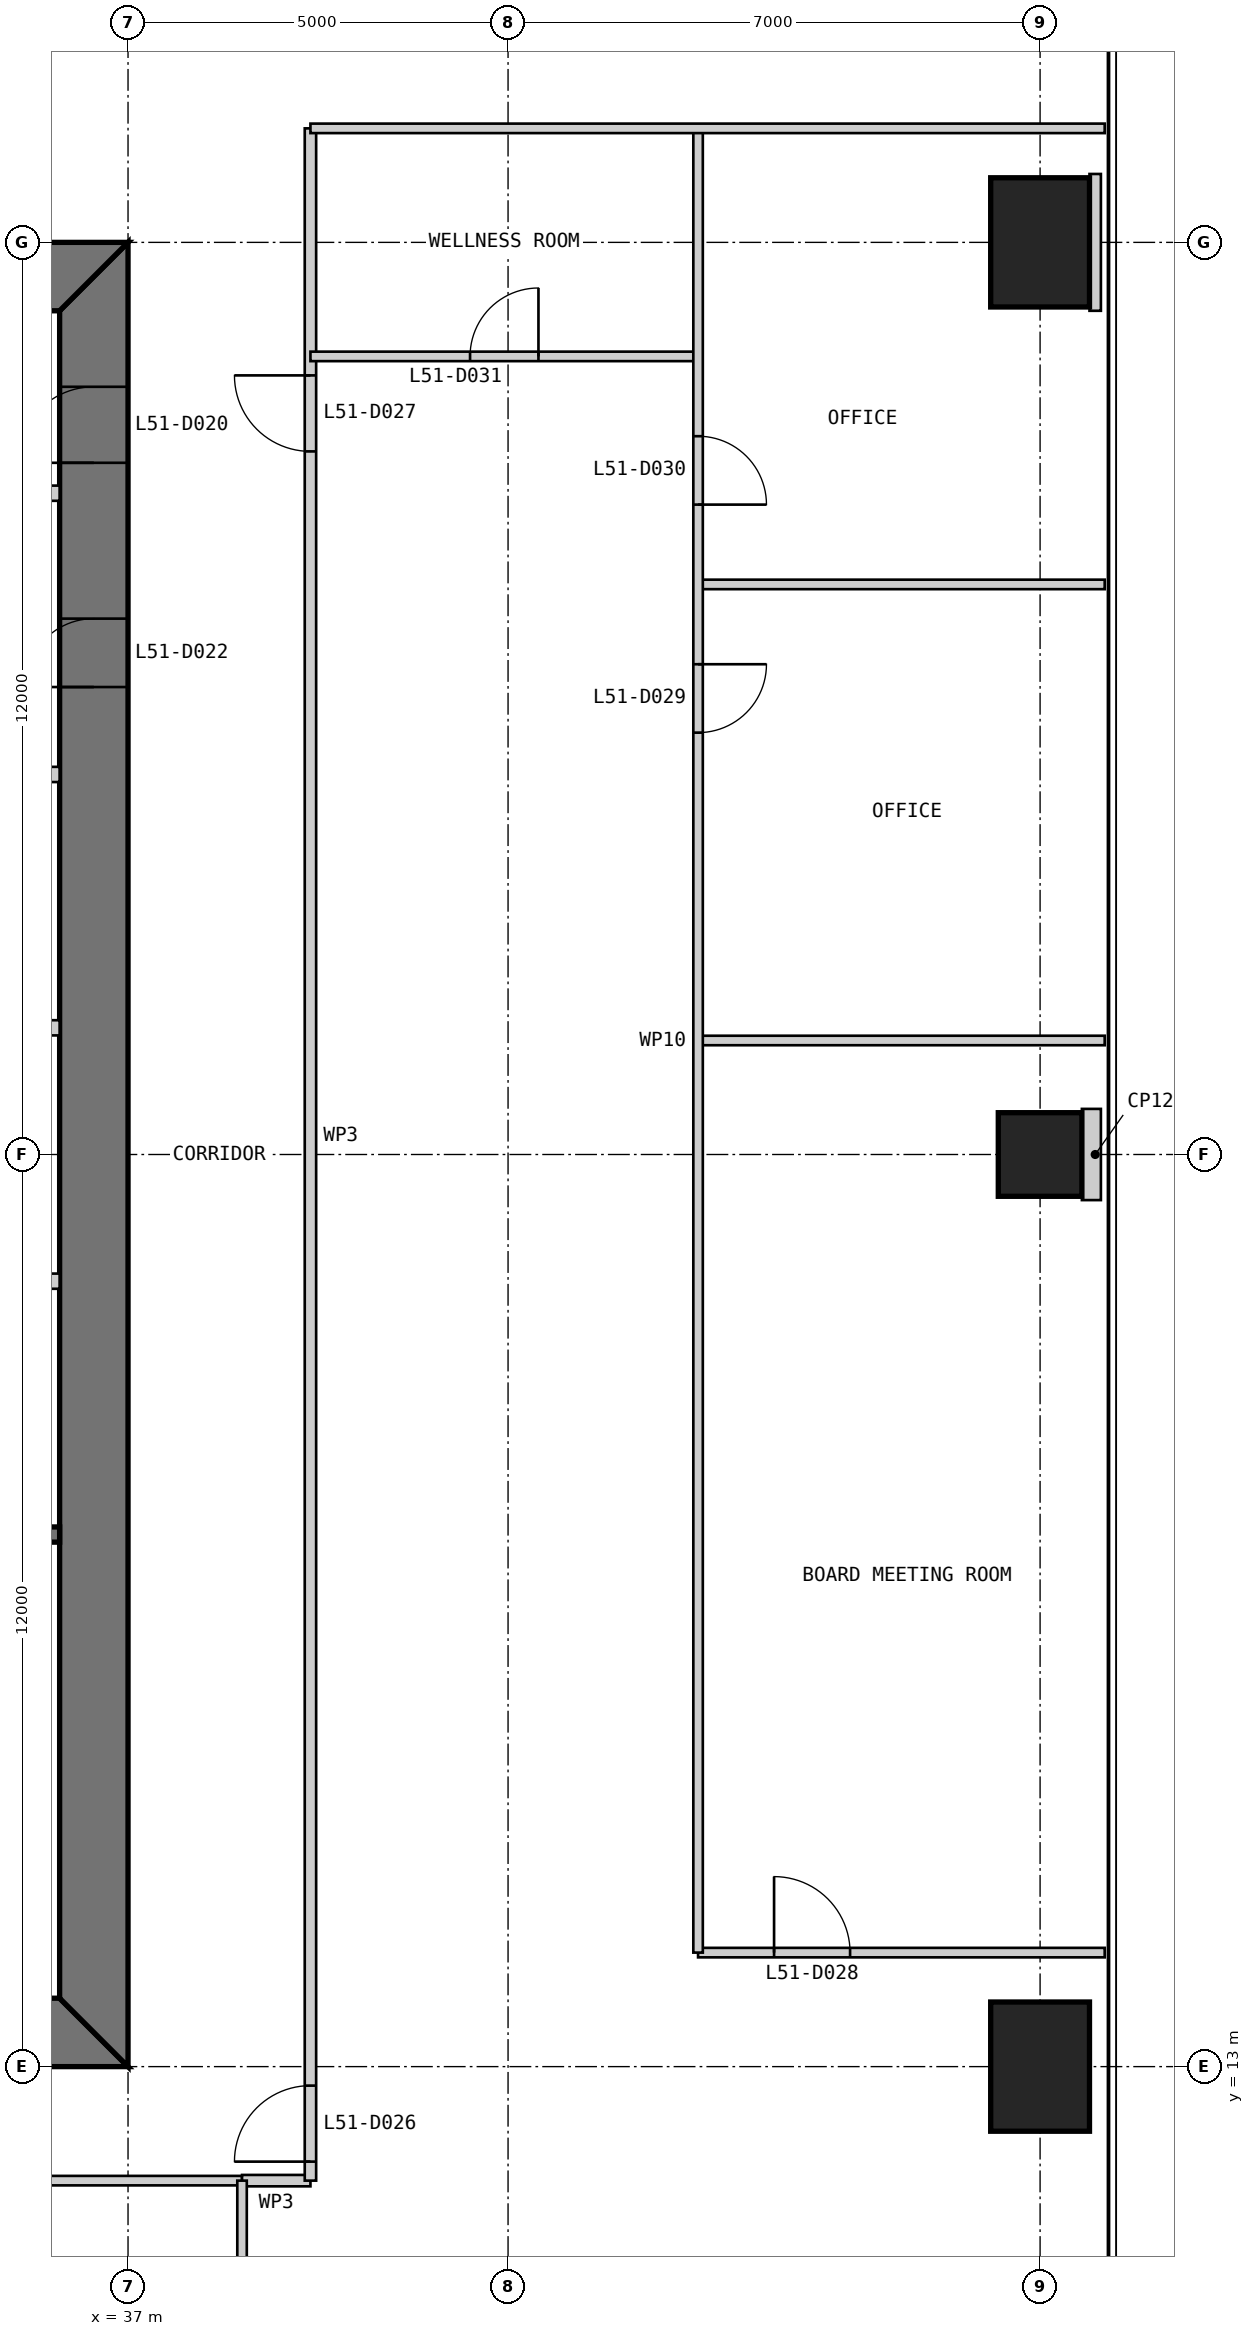
"""IFC4 building model, lengths in metres.
Left out: names, types, materials, properties, quantities, classifications, styles, units other than length and angle.
Written with IfcOpenShell. Run it as: python <this file> out.ifc"""

import sys

from ifc_helpers import new_model, si_unit, direction, frame, frame_2d, origin, origin_2d, place, context, subcontext, project, spatial, polyline, rectangle, outline, extrude, element, fill, save


model = new_model("IFC4")
c1 = context("Model", 3, precision=1e-05, world=origin(), true_north=direction((0.0, 1.0)))
c2 = subcontext(c1, "Body", "Model", "MODEL_VIEW")
j1 = project(units=[si_unit("LENGTHUNIT", "METRE"), si_unit("PLANEANGLEUNIT", "RADIAN")], contexts=[c1])
p1 = place(None, origin())
s1 = spatial("IfcSite", under=j1, at=p1, CompositionType="ELEMENT")
p2 = place(p1, origin())
s2 = spatial("IfcBuilding", under=s1, at=p2, CompositionType="ELEMENT")
p3 = place(p2, frame((0.0, 0.0, 217.8)))
s3 = spatial("IfcBuildingStorey", under=s2, at=p3, CompositionType="ELEMENT", Elevation=217.8)
p4 = place(p3, frame((49.0, 13.0, 0.0), z_axis=(0.0, 0.0, 1.0), x_axis=(1.0, 0.0, 0.0)))
e1 = element("IfcColumn", 1, at=p4, inside=s3, PredefinedType="COLUMN", context=c2, shape_type="SweptSolid", body=[
    extrude(rectangle(XDim=1.3, YDim=1.7, at=origin_2d()), origin(), (0.0, 0.0, 1.0), 4.0),
])
p5 = place(p3, frame((49.0, 25.0, 0.0), z_axis=(0.0, 0.0, 1.0), x_axis=(1.0, 0.0, 0.0)))
e2 = element("IfcColumn", 2, at=p5, inside=s3, PredefinedType="COLUMN", context=c2, shape_type="SweptSolid", body=[
    extrude(rectangle(XDim=1.1, YDim=1.1, at=origin_2d()), origin(), (0.0, 0.0, 1.0), 4.0),
])
p6 = place(p3, frame((49.0, 37.0, 0.0), z_axis=(0.0, 0.0, 1.0), x_axis=(1.0, 0.0, 0.0)))
e3 = element("IfcColumn", 3, at=p6, inside=s3, PredefinedType="COLUMN", context=c2, shape_type="SweptSolid", body=[
    extrude(rectangle(XDim=1.3, YDim=1.7, at=origin_2d()), origin(), (0.0, 0.0, 1.0), 4.0),
])
p7 = place(p3, frame((13.0, 13.45, 0.0), z_axis=(0.0, 0.0, 1.0), x_axis=(1.0, 0.0, 0.0)))
e4 = element("IfcWall", 4, at=p7, inside=s3, PredefinedType="SHEAR", context=c2, shape_type="SweptSolid", body=[
    extrude(outline(polyline([(0.0, -0.45), (24.0, -0.45), (23.1, 0.45), (0.9, 0.45), (0.0, -0.45)])), origin(), (0.0, 0.0, 1.0), 4.0),
])
p8 = place(p7, frame((4.9, 0.0, 0.0)))
e5 = element("IfcOpeningElement", 5, at=p8, cuts=e4, PredefinedType="OPENING", context=c2, shape_type="SweptSolid", body=[
    extrude(rectangle(XDim=1.0, YDim=2.2, at=frame_2d((0.5, 1.1))), frame((0.0, 0.46, 0.0), z_axis=(0.0, -1.0, 0.0), x_axis=(1.0, 0.0, 0.0)), (0.0, 0.0, 1.0), 0.92),
])
p9 = place(p7, frame((8.9, 0.0, 0.0)))
e6 = element("IfcOpeningElement", 6, at=p9, cuts=e4, PredefinedType="OPENING", context=c2, shape_type="SweptSolid", body=[
    extrude(rectangle(XDim=1.1, YDim=2.2, at=frame_2d((0.55, 1.1))), frame((0.0, 0.46, 0.0), z_axis=(0.0, -1.0, 0.0), x_axis=(1.0, 0.0, 0.0)), (0.0, 0.0, 1.0), 0.92),
])
p10 = place(p7, frame((15.05, 0.0, 0.0)))
e7 = element("IfcOpeningElement", 7, at=p10, cuts=e4, PredefinedType="OPENING", context=c2, shape_type="SweptSolid", body=[
    extrude(rectangle(XDim=0.9, YDim=2.2, at=frame_2d((0.45, 1.1))), frame((0.0, 0.46, 0.0), z_axis=(0.0, -1.0, 0.0), x_axis=(1.0, 0.0, 0.0)), (0.0, 0.0, 1.0), 0.92),
])
p11 = place(p7, frame((17.9, 0.0, 0.0)))
e8 = element("IfcOpeningElement", 8, at=p11, cuts=e4, PredefinedType="OPENING", context=c2, shape_type="SweptSolid", body=[
    extrude(rectangle(XDim=1.0, YDim=2.2, at=frame_2d((0.5, 1.1))), frame((0.0, 0.46, 0.0), z_axis=(0.0, -1.0, 0.0), x_axis=(1.0, 0.0, 0.0)), (0.0, 0.0, 1.0), 0.92),
])
p12 = place(p7, frame((21.4, 0.0, 0.0)))
e9 = element("IfcOpeningElement", 9, at=p12, cuts=e4, PredefinedType="OPENING", context=c2, shape_type="SweptSolid", body=[
    extrude(rectangle(XDim=1.0, YDim=2.2, at=frame_2d((0.5, 1.1))), frame((0.0, 0.46, 0.0), z_axis=(0.0, -1.0, 0.0), x_axis=(1.0, 0.0, 0.0)), (0.0, 0.0, 1.0), 0.92),
])
p13 = place(p3, frame((36.55, 13.9, 0.0), z_axis=(0.0, 0.0, 1.0), x_axis=(0.0, 1.0, 0.0)))
e10 = element("IfcWall", 10, at=p13, inside=s3, PredefinedType="SHEAR", context=c2, shape_type="SweptSolid", body=[
    extrude(outline(polyline([(-0.9, -0.45), (23.1, -0.45), (22.2, 0.45), (0.0, 0.45), (-0.9, -0.45)])), origin(), (0.0, 0.0, 1.0), 4.0),
])
p14 = place(p13, frame((20.2, 0.0, 0.0)))
e11 = element("IfcOpeningElement", 11, at=p14, cuts=e10, PredefinedType="OPENING", context=c2, shape_type="SweptSolid", body=[
    extrude(rectangle(XDim=1.0, YDim=2.2, at=frame_2d((0.5, 1.1))), frame((0.0, 0.46, 0.0), z_axis=(0.0, -1.0, 0.0), x_axis=(1.0, 0.0, 0.0)), (0.0, 0.0, 1.0), 0.92),
])
p15 = place(p13, frame((17.25, 0.0, 0.0)))
e12 = element("IfcOpeningElement", 12, at=p15, cuts=e10, PredefinedType="OPENING", context=c2, shape_type="SweptSolid", body=[
    extrude(rectangle(XDim=0.9, YDim=2.2, at=frame_2d((0.45, 1.1))), frame((0.0, 0.46, 0.0), z_axis=(0.0, -1.0, 0.0), x_axis=(1.0, 0.0, 0.0)), (0.0, 0.0, 1.0), 0.92),
])
p16 = place(p3, frame((37.0, 36.55, 0.0), z_axis=(0.0, 0.0, 1.0), x_axis=(-1.0, 0.0, 0.0)))
e13 = element("IfcWall", 13, at=p16, inside=s3, PredefinedType="SHEAR", context=c2, shape_type="SweptSolid", body=[
    extrude(outline(polyline([(0.0, -0.45), (24.0, -0.45), (23.1, 0.45), (0.9, 0.45), (0.0, -0.45)])), origin(), (0.0, 0.0, 1.0), 4.0),
])
p17 = place(p16, frame((4.9, 0.0, 0.0)))
e14 = element("IfcOpeningElement", 14, at=p17, cuts=e13, PredefinedType="OPENING", context=c2, shape_type="SweptSolid", body=[
    extrude(rectangle(XDim=1.0, YDim=2.2, at=frame_2d((0.5, 1.1))), frame((0.0, 0.46, 0.0), z_axis=(0.0, -1.0, 0.0), x_axis=(1.0, 0.0, 0.0)), (0.0, 0.0, 1.0), 0.92),
])
p18 = place(p16, frame((8.9, 0.0, 0.0)))
e15 = element("IfcOpeningElement", 15, at=p18, cuts=e13, PredefinedType="OPENING", context=c2, shape_type="SweptSolid", body=[
    extrude(rectangle(XDim=1.1, YDim=2.2, at=frame_2d((0.55, 1.1))), frame((0.0, 0.46, 0.0), z_axis=(0.0, -1.0, 0.0), x_axis=(1.0, 0.0, 0.0)), (0.0, 0.0, 1.0), 0.92),
])
p19 = place(p16, frame((15.05, 0.0, 0.0)))
e16 = element("IfcOpeningElement", 16, at=p19, cuts=e13, PredefinedType="OPENING", context=c2, shape_type="SweptSolid", body=[
    extrude(rectangle(XDim=0.9, YDim=2.2, at=frame_2d((0.45, 1.1))), frame((0.0, 0.46, 0.0), z_axis=(0.0, -1.0, 0.0), x_axis=(1.0, 0.0, 0.0)), (0.0, 0.0, 1.0), 0.92),
])
p20 = place(p16, frame((17.9, 0.0, 0.0)))
e17 = element("IfcOpeningElement", 17, at=p20, cuts=e13, PredefinedType="OPENING", context=c2, shape_type="SweptSolid", body=[
    extrude(rectangle(XDim=1.0, YDim=2.2, at=frame_2d((0.5, 1.1))), frame((0.0, 0.46, 0.0), z_axis=(0.0, -1.0, 0.0), x_axis=(1.0, 0.0, 0.0)), (0.0, 0.0, 1.0), 0.92),
])
p21 = place(p16, frame((21.4, 0.0, 0.0)))
e18 = element("IfcOpeningElement", 18, at=p21, cuts=e13, PredefinedType="OPENING", context=c2, shape_type="SweptSolid", body=[
    extrude(rectangle(XDim=1.0, YDim=2.2, at=frame_2d((0.5, 1.1))), frame((0.0, 0.46, 0.0), z_axis=(0.0, -1.0, 0.0), x_axis=(1.0, 0.0, 0.0)), (0.0, 0.0, 1.0), 0.92),
])
p22 = place(p3, frame((20.3, 20.0, 0.0), z_axis=(0.0, 0.0, 1.0), x_axis=(1.0, 0.0, 0.0)))
e19 = element("IfcWall", 19, at=p22, inside=s3, PredefinedType="SOLIDWALL", context=c2, shape_type="SweptSolid", body=[
    extrude(rectangle(XDim=15.8, YDim=0.2, at=frame_2d((7.9, 0.0))), origin(), (0.0, 0.0, 1.0), 3.8),
])
for number, where, z_axis, x_axis in (
    (20, (36.1, 30.0, 0.0), (0.0, 0.0, 1.0), (-1.0, 0.0, 0.0)),
    (21, (36.1, 26.667, 0.0), (0.0, 0.0, 1.0), (-1.0, 0.0, 0.0)),
    (22, (36.1, 23.333, 0.0), (0.0, 0.0, 1.0), (-1.0, 0.0, 0.0)),
    (23, (36.1, 33.7, 0.0), (0.0, 0.0, 1.0), (-1.0, 0.0, 0.0)),
):
    element("IfcWall", number, at=place(p3, frame(where, z_axis=z_axis, x_axis=x_axis)), inside=s3, PredefinedType="PARTITIONING", context=c2, shape_type="SweptSolid", body=[
        extrude(rectangle(XDim=2.8, YDim=0.2, at=frame_2d((1.4, 0.0))), origin(), (0.0, 0.0, 1.0), 3.8),
    ])
p23 = place(p3, frame((35.5, 11.5, 0.0), z_axis=(0.0, 0.0, 1.0), x_axis=(1.0, 0.0, 0.0)))
e24 = element("IfcWall", 24, at=p23, inside=s3, PredefinedType="PARTITIONING", context=c2, shape_type="SweptSolid", body=[
    extrude(rectangle(XDim=3.0, YDim=0.125, at=frame_2d((1.5, 0.0))), origin(), (0.0, 0.0, 1.0), 3.85),
])
p24 = place(p3, frame((38.5, 11.5, 0.0), z_axis=(0.0, 0.0, 1.0), x_axis=(1.0, 0.0, 0.0)))
e25 = element("IfcWall", 25, at=p24, inside=s3, PredefinedType="PARTITIONING", context=c2, shape_type="SweptSolid", body=[
    extrude(rectangle(XDim=0.9, YDim=0.15, at=frame_2d((0.45, 0.0))), origin(), (0.0, 0.0, 1.0), 3.85),
])
p25 = place(p3, frame((39.4, 11.5, 0.0), z_axis=(0.0, 0.0, 1.0), x_axis=(0.0, 1.0, 0.0)))
e26 = element("IfcWall", 26, at=p25, inside=s3, PredefinedType="PARTITIONING", context=c2, shape_type="SweptSolid", body=[
    extrude(rectangle(XDim=27.0, YDim=0.15, at=frame_2d((13.5, 0.0))), origin(), (0.0, 0.0, 1.0), 3.85),
])
p26 = place(p25, frame((0.25, 0.0, 0.0)))
e27 = element("IfcOpeningElement", 27, at=p26, cuts=e26, PredefinedType="OPENING", context=c2, shape_type="SweptSolid", body=[
    extrude(rectangle(XDim=1.0, YDim=2.2, at=frame_2d((0.5, 1.1))), frame((0.0, 0.085, 0.0), z_axis=(0.0, -1.0, 0.0), x_axis=(1.0, 0.0, 0.0)), (0.0, 0.0, 1.0), 0.17),
])
p27 = place(p25, frame((22.75, 0.0, 0.0)))
e28 = element("IfcOpeningElement", 28, at=p27, cuts=e26, PredefinedType="OPENING", context=c2, shape_type="SweptSolid", body=[
    extrude(rectangle(XDim=1.0, YDim=2.2, at=frame_2d((0.5, 1.1))), frame((0.0, 0.085, 0.0), z_axis=(0.0, -1.0, 0.0), x_axis=(1.0, 0.0, 0.0)), (0.0, 0.0, 1.0), 0.17),
])
p28 = place(p3, frame((38.5, 0.15, 0.0), z_axis=(0.0, 0.0, 1.0), x_axis=(0.0, 1.0, 0.0)))
e29 = element("IfcWall", 29, at=p28, inside=s3, PredefinedType="PARTITIONING", context=c2, shape_type="SweptSolid", body=[
    extrude(rectangle(XDim=11.35, YDim=0.125, at=frame_2d((5.675, 0.0))), origin(), (0.0, 0.0, 1.0), 3.85),
])
p29 = place(p3, frame((49.85, 14.5, 0.0), z_axis=(0.0, 0.0, 1.0), x_axis=(-1.0, 0.0, 0.0)))
e30 = element("IfcWall", 30, at=p29, inside=s3, PredefinedType="PARTITIONING", context=c2, shape_type="SweptSolid", body=[
    extrude(rectangle(XDim=5.35, YDim=0.125, at=frame_2d((2.675, 0.0))), origin(), (0.0, 0.0, 1.0), 3.85),
])
p30 = place(p29, frame((3.35, 0.0, 0.0)))
e31 = element("IfcOpeningElement", 31, at=p30, cuts=e30, PredefinedType="OPENING", context=c2, shape_type="SweptSolid", body=[
    extrude(rectangle(XDim=1.0, YDim=2.2, at=frame_2d((0.5, 1.1))), frame((0.0, 0.073, 0.0), z_axis=(0.0, -1.0, 0.0), x_axis=(1.0, 0.0, 0.0)), (0.0, 0.0, 1.0), 0.145),
])
for number, where, z_axis, x_axis in (
    (32, (49.85, 26.5, 0.0), (0.0, 0.0, 1.0), (-1.0, 0.0, 0.0)),
    (33, (49.85, 32.5, 0.0), (0.0, 0.0, 1.0), (-1.0, 0.0, 0.0)),
):
    element("IfcWall", number, at=place(p3, frame(where, z_axis=z_axis, x_axis=x_axis)), inside=s3, PredefinedType="PARTITIONING", context=c2, shape_type="SweptSolid", body=[
        extrude(rectangle(XDim=5.35, YDim=0.125, at=frame_2d((2.675, 0.0))), origin(), (0.0, 0.0, 1.0), 3.85),
    ])
p31 = place(p3, frame((44.5, 35.5, 0.0), z_axis=(0.0, 0.0, 1.0), x_axis=(-1.0, 0.0, 0.0)))
e34 = element("IfcWall", 34, at=p31, inside=s3, PredefinedType="PARTITIONING", context=c2, shape_type="SweptSolid", body=[
    extrude(rectangle(XDim=5.1, YDim=0.125, at=frame_2d((2.55, 0.0))), origin(), (0.0, 0.0, 1.0), 3.85),
])
p32 = place(p31, frame((2.1, 0.0, 0.0)))
e35 = element("IfcOpeningElement", 35, at=p32, cuts=e34, PredefinedType="OPENING", context=c2, shape_type="SweptSolid", body=[
    extrude(rectangle(XDim=0.9, YDim=2.2, at=frame_2d((0.45, 1.1))), frame((0.0, 0.073, 0.0), z_axis=(0.0, -1.0, 0.0), x_axis=(1.0, 0.0, 0.0)), (0.0, 0.0, 1.0), 0.145),
])
p33 = place(p3, frame((44.5, 14.5, 0.0), z_axis=(0.0, 0.0, 1.0), x_axis=(0.0, 1.0, 0.0)))
e36 = element("IfcWall", 36, at=p33, inside=s3, PredefinedType="PARTITIONING", context=c2, shape_type="SweptSolid", body=[
    extrude(rectangle(XDim=24.0, YDim=0.125, at=frame_2d((12.0, 0.0))), origin(), (0.0, 0.0, 1.0), 3.85),
])
p34 = place(p33, frame((16.05, 0.0, 0.0)))
e37 = element("IfcOpeningElement", 37, at=p34, cuts=e36, PredefinedType="OPENING", context=c2, shape_type="SweptSolid", body=[
    extrude(rectangle(XDim=0.9, YDim=2.2, at=frame_2d((0.45, 1.1))), frame((0.0, 0.073, 0.0), z_axis=(0.0, -1.0, 0.0), x_axis=(1.0, 0.0, 0.0)), (0.0, 0.0, 1.0), 0.145),
])
p35 = place(p33, frame((19.05, 0.0, 0.0)))
e38 = element("IfcOpeningElement", 38, at=p35, cuts=e36, PredefinedType="OPENING", context=c2, shape_type="SweptSolid", body=[
    extrude(rectangle(XDim=0.9, YDim=2.2, at=frame_2d((0.45, 1.1))), frame((0.0, 0.073, 0.0), z_axis=(0.0, -1.0, 0.0), x_axis=(1.0, 0.0, 0.0)), (0.0, 0.0, 1.0), 0.145),
])
p36 = place(p3, frame((49.85, 38.5, 0.0), z_axis=(0.0, 0.0, 1.0), x_axis=(-1.0, 0.0, 0.0)))
e39 = element("IfcWall", 39, at=p36, inside=s3, PredefinedType="PARTITIONING", context=c2, shape_type="SweptSolid", body=[
    extrude(rectangle(XDim=10.45, YDim=0.125, at=frame_2d((5.225, 0.0))), origin(), (0.0, 0.0, 1.0), 3.85),
])
p37 = place(p3, frame((49.8, 25.0, 0.0), z_axis=(0.0, 0.0, 1.0), x_axis=(-1.0, 0.0, 0.0)))
e40 = element("IfcWall", 40, at=p37, inside=s3, PredefinedType="PARTITIONING", context=c2, shape_type="SweptSolid", body=[
    extrude(rectangle(XDim=0.25, YDim=1.2, at=frame_2d((0.125, 0.0))), origin(), (0.0, 0.0, 1.0), 3.85),
])
p38 = place(p3, frame((49.8, 37.0, 0.0), z_axis=(0.0, 0.0, 1.0), x_axis=(-1.0, 0.0, 0.0)))
e41 = element("IfcWall", 41, at=p38, inside=s3, PredefinedType="PARTITIONING", context=c2, shape_type="SweptSolid", body=[
    extrude(rectangle(XDim=0.15, YDim=1.8, at=frame_2d((0.075, 0.0))), origin(), (0.0, 0.0, 1.0), 3.85),
])
p39 = place(p14, origin())
e42 = element("IfcDoor", 42, at=p39, inside=s3, OperationType="SINGLE_SWING_LEFT", PredefinedType="DOOR", context=c2, shape_type="SweptSolid", body=[
    extrude(rectangle(XDim=1.0, YDim=2.2, at=frame_2d((0.5, 1.1))), frame((0.0, 0.025, 0.0), z_axis=(0.0, -1.0, 0.0), x_axis=(1.0, 0.0, 0.0)), (0.0, 0.0, 1.0), 0.05),
    extrude(outline(polyline([(0.0, 0.0), (0.04, 0.0), (0.04, 2.16), (0.96, 2.16), (0.96, 0.0), (1.0, 0.0), (1.0, 2.2), (0.0, 2.2), (0.0, 0.0)])), frame((0.0, 0.3, 0.0), z_axis=(0.0, -1.0, 0.0), x_axis=(1.0, 0.0, 0.0)), (0.0, 0.0, 1.0), 0.6),
])
fill(e11, e42)
p40 = place(p15, origin())
e43 = element("IfcDoor", 43, at=p40, inside=s3, OperationType="SINGLE_SWING_LEFT", PredefinedType="DOOR", context=c2, shape_type="SweptSolid", body=[
    extrude(rectangle(XDim=0.9, YDim=2.2, at=frame_2d((0.45, 1.1))), frame((0.0, 0.025, 0.0), z_axis=(0.0, -1.0, 0.0), x_axis=(1.0, 0.0, 0.0)), (0.0, 0.0, 1.0), 0.05),
    extrude(outline(polyline([(0.0, 0.0), (0.04, 0.0), (0.04, 2.16), (0.86, 2.16), (0.86, 0.0), (0.9, 0.0), (0.9, 2.2), (0.0, 2.2), (0.0, 0.0)])), frame((0.0, 0.3, 0.0), z_axis=(0.0, -1.0, 0.0), x_axis=(1.0, 0.0, 0.0)), (0.0, 0.0, 1.0), 0.6),
])
fill(e12, e43)
p41 = place(p26, origin())
e44 = element("IfcDoor", 44, at=p41, inside=s3, OperationType="SINGLE_SWING_LEFT", PredefinedType="DOOR", context=c2, shape_type="SweptSolid", body=[
    extrude(rectangle(XDim=1.0, YDim=2.2, at=frame_2d((0.5, 1.1))), frame((0.0, 0.025, 0.0), z_axis=(0.0, -1.0, 0.0), x_axis=(1.0, 0.0, 0.0)), (0.0, 0.0, 1.0), 0.05),
])
fill(e27, e44)
p42 = place(p27, origin())
e45 = element("IfcDoor", 45, at=p42, inside=s3, OperationType="SINGLE_SWING_RIGHT", PredefinedType="DOOR", context=c2, shape_type="SweptSolid", body=[
    extrude(rectangle(XDim=1.0, YDim=2.2, at=frame_2d((0.5, 1.1))), frame((0.0, 0.025, 0.0), z_axis=(0.0, -1.0, 0.0), x_axis=(1.0, 0.0, 0.0)), (0.0, 0.0, 1.0), 0.05),
])
fill(e28, e45)
p43 = place(p30, frame((1.0, 0.0, 0.0), z_axis=(0.0, 0.0, 1.0), x_axis=(-1.0, 0.0, 0.0)))
e46 = element("IfcDoor", 46, at=p43, inside=s3, OperationType="SINGLE_SWING_LEFT", PredefinedType="DOOR", context=c2, shape_type="SweptSolid", body=[
    extrude(rectangle(XDim=1.0, YDim=2.2, at=frame_2d((0.5, 1.1))), frame((0.0, 0.025, 0.0), z_axis=(0.0, -1.0, 0.0), x_axis=(1.0, 0.0, 0.0)), (0.0, 0.0, 1.0), 0.05),
])
fill(e31, e46)
p44 = place(p34, frame((0.9, 0.0, 0.0), z_axis=(0.0, 0.0, 1.0), x_axis=(-1.0, 0.0, 0.0)))
e47 = element("IfcDoor", 47, at=p44, inside=s3, OperationType="SINGLE_SWING_LEFT", PredefinedType="DOOR", context=c2, shape_type="SweptSolid", body=[
    extrude(rectangle(XDim=0.9, YDim=2.2, at=frame_2d((0.45, 1.1))), frame((0.0, 0.025, 0.0), z_axis=(0.0, -1.0, 0.0), x_axis=(1.0, 0.0, 0.0)), (0.0, 0.0, 1.0), 0.05),
])
fill(e37, e47)
p45 = place(p35, frame((0.9, 0.0, 0.0), z_axis=(0.0, 0.0, 1.0), x_axis=(-1.0, 0.0, 0.0)))
e48 = element("IfcDoor", 48, at=p45, inside=s3, OperationType="SINGLE_SWING_RIGHT", PredefinedType="DOOR", context=c2, shape_type="SweptSolid", body=[
    extrude(rectangle(XDim=0.9, YDim=2.2, at=frame_2d((0.45, 1.1))), frame((0.0, 0.025, 0.0), z_axis=(0.0, -1.0, 0.0), x_axis=(1.0, 0.0, 0.0)), (0.0, 0.0, 1.0), 0.05),
])
fill(e38, e48)
p46 = place(p32, frame((0.9, 0.0, 0.0), z_axis=(0.0, 0.0, 1.0), x_axis=(-1.0, 0.0, 0.0)))
e49 = element("IfcDoor", 49, at=p46, inside=s3, OperationType="SINGLE_SWING_RIGHT", PredefinedType="DOOR", context=c2, shape_type="SweptSolid", body=[
    extrude(rectangle(XDim=0.9, YDim=2.2, at=frame_2d((0.45, 1.1))), frame((0.0, 0.025, 0.0), z_axis=(0.0, -1.0, 0.0), x_axis=(1.0, 0.0, 0.0)), (0.0, 0.0, 1.0), 0.05),
])
fill(e35, e49)
save(model, sys.argv[1])
